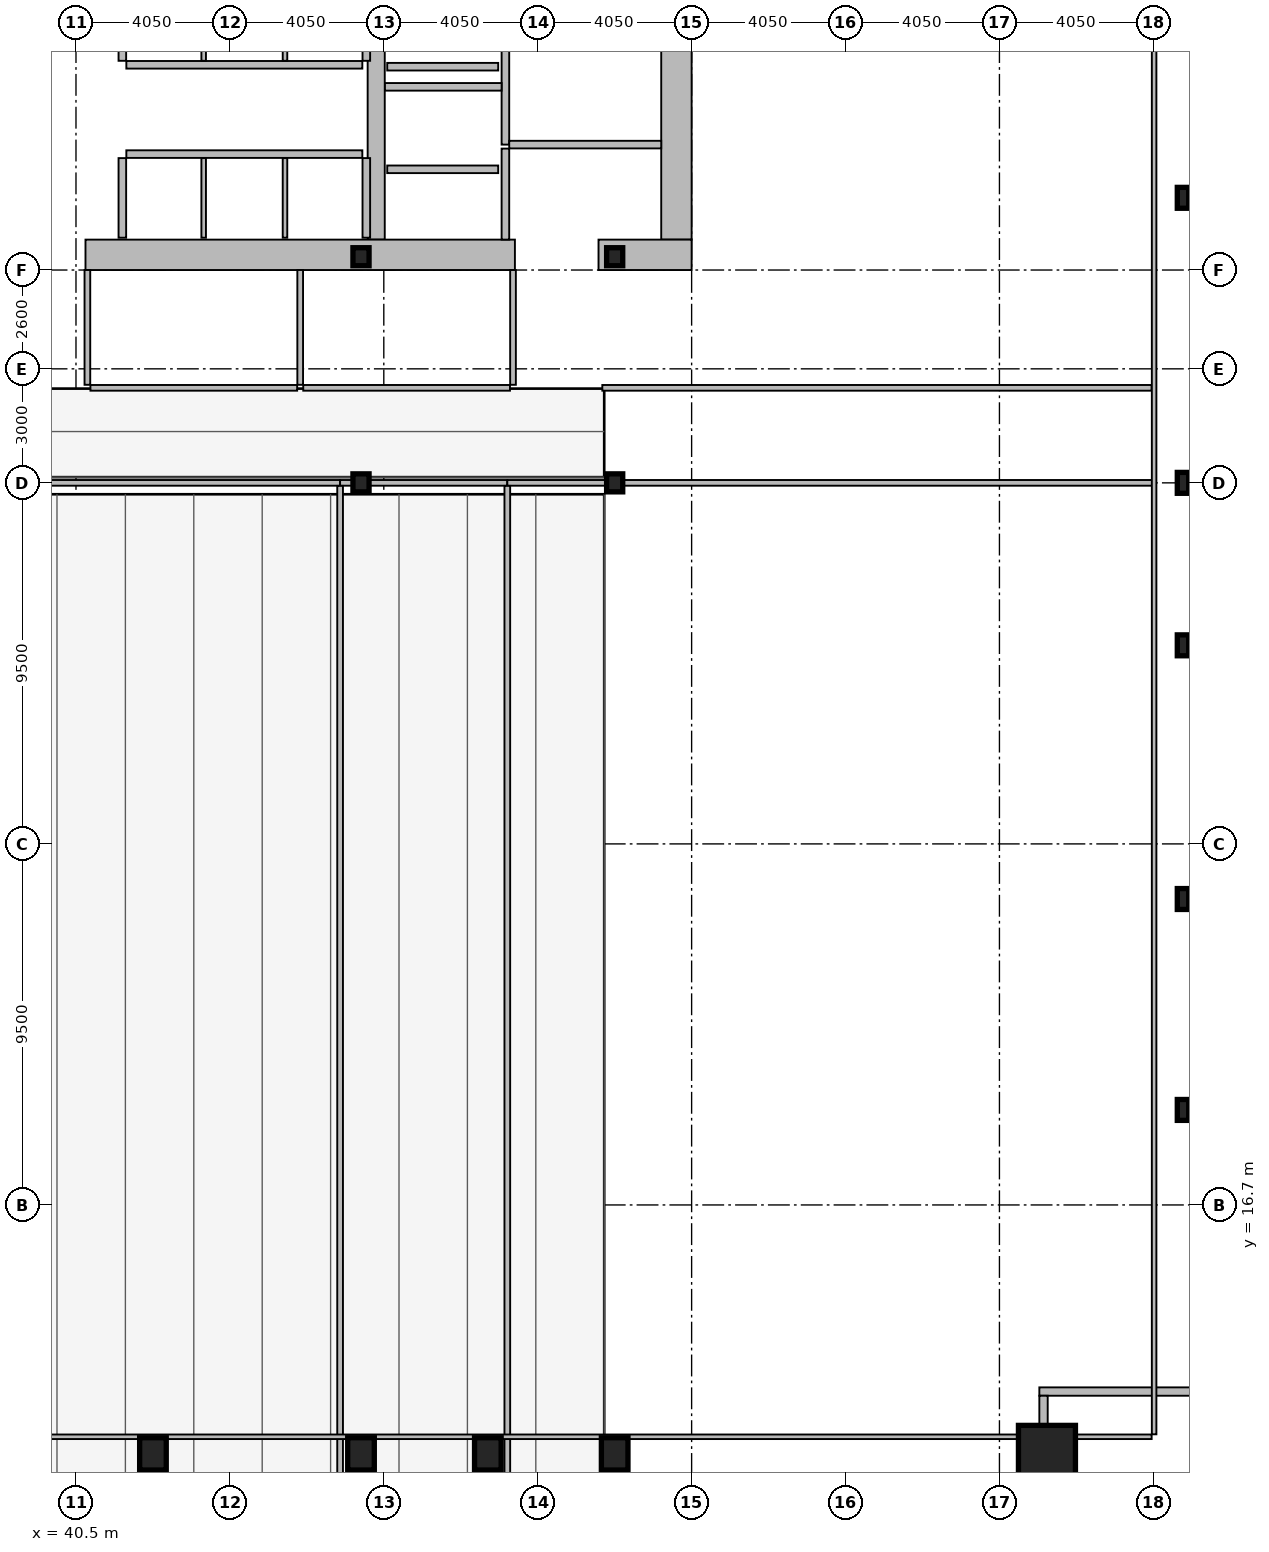
"""IFC4 building model, lengths in metres.
Left out: names, types, materials, properties, quantities, classifications, styles, units other than length and angle.
Written with IfcOpenShell. Run it as: python <this file> out.ifc"""

import sys

from ifc_helpers import new_model, si_unit, direction, frame, frame_2d, origin, origin_2d, place, context, subcontext, project, spatial, rectangle, hollow_rectangle, i_section, extrude, element, fill, save


model = new_model("IFC4")
c1 = context("Model", 3, precision=1e-05, world=origin(), true_north=direction((0.0, 1.0)))
c2 = subcontext(c1, "Body", "Model", "MODEL_VIEW")
j1 = project(units=[si_unit("LENGTHUNIT", "METRE"), si_unit("PLANEANGLEUNIT", "RADIAN")], contexts=[c1])
p1 = place(None, origin())
s1 = spatial("IfcSite", under=j1, at=p1, CompositionType="ELEMENT")
p2 = place(p1, origin())
s2 = spatial("IfcBuilding", under=s1, at=p2, CompositionType="ELEMENT")
p3 = place(p2, frame((0.0, 0.0, 85.8)))
s3 = spatial("IfcBuildingStorey", under=s2, at=p3, CompositionType="ELEMENT", Elevation=85.8)
p4 = place(p3, frame((56.3, 52.9, 0.0), z_axis=(0.0, 0.0, 1.0), x_axis=(0.0, -1.0, 0.0)))
e1 = element("IfcWall", 1, at=p4, inside=s3, PredefinedType="SHEAR", context=c2, shape_type="SweptSolid", body=[
    extrude(rectangle(XDim=10.8, YDim=0.8, at=frame_2d((5.4, 0.0))), origin(), (0.0, 0.0, 1.0), 4.62),
])
p5 = place(p3, frame((48.4, 42.1, 0.0), z_axis=(0.0, 0.0, 1.0), x_axis=(0.0, 1.0, 0.0)))
e2 = element("IfcWall", 2, at=p5, inside=s3, PredefinedType="SHEAR", context=c2, shape_type="SweptSolid", body=[
    extrude(rectangle(XDim=10.8, YDim=0.45, at=frame_2d((5.4, 0.0))), origin(), (0.0, 0.0, 1.0), 4.62),
])
p6 = place(p3, frame((52.05, 41.7, 0.0), z_axis=(0.0, 0.0, 1.0), x_axis=(-1.0, 0.0, 0.0)))
e3 = element("IfcWall", 3, at=p6, inside=s3, PredefinedType="SHEAR", context=c2, shape_type="SweptSolid", body=[
    extrude(rectangle(XDim=11.3, YDim=0.8, at=frame_2d((5.65, 0.0))), origin(), (0.0, 0.0, 1.0), 4.62),
])
p7 = place(p3, frame((56.7, 41.7, 0.0), z_axis=(0.0, 0.0, 1.0), x_axis=(-1.0, 0.0, 0.0)))
e4 = element("IfcWall", 4, at=p7, inside=s3, PredefinedType="SHEAR", context=c2, shape_type="SweptSolid", body=[
    extrude(rectangle(XDim=2.45, YDim=0.8, at=frame_2d((1.225, 0.0))), origin(), (0.0, 0.0, 1.0), 4.62),
])
p8 = place(p3, frame((66.05, 10.15, 0.0), z_axis=(0.0, 0.0, 1.0), x_axis=(1.0, 0.0, 0.0)))
e5 = element("IfcColumn", 5, at=p8, inside=s3, PredefinedType="COLUMN", context=c2, shape_type="SweptSolid", body=[
    extrude(hollow_rectangle(XDim=1.5, YDim=1.5, WallThickness=0.07, at=origin_2d()), origin(), (0.0, 0.0, 1.0), 4.8),
])
for number, where, z_axis, x_axis in (
    (6, (42.525, 10.15, 0.0), (0.0, 0.0, 1.0), (1.0, 0.0, 0.0)),
    (7, (48.0, 10.15, 0.0), (0.0, 0.0, 1.0), (1.0, 0.0, 0.0)),
    (8, (51.337, 10.15, 0.0), (0.0, 0.0, 1.0), (1.0, 0.0, 0.0)),
    (9, (54.675, 10.15, 0.0), (0.0, 0.0, 1.0), (1.0, 0.0, 0.0)),
):
    element("IfcColumn", number, at=place(p3, frame(where, z_axis=z_axis, x_axis=x_axis)), inside=s3, PredefinedType="COLUMN", context=c2, shape_type="SweptSolid", body=[
        extrude(hollow_rectangle(XDim=0.7, YDim=0.85, WallThickness=0.05, at=origin_2d()), origin(), (0.0, 0.0, 1.0), 4.8),
    ])
for number, where, z_axis, x_axis in (
    (10, (69.63, 19.2, 0.0), (0.0, 0.0, 1.0), (1.0, 0.0, 0.0)),
    (11, (69.63, 24.75, 0.0), (0.0, 0.0, 1.0), (1.0, 0.0, 0.0)),
    (12, (69.63, 31.425, 0.0), (0.0, 0.0, 1.0), (1.0, 0.0, 0.0)),
    (13, (69.63, 35.7, 0.0), (0.0, 0.0, 1.0), (1.0, 0.0, 0.0)),
    (14, (69.63, 43.2, 0.0), (0.0, 0.0, 1.0), (1.0, 0.0, 0.0)),
):
    element("IfcColumn", number, at=place(p3, frame(where, z_axis=z_axis, x_axis=x_axis)), inside=s3, PredefinedType="COLUMN", context=c2, shape_type="SweptSolid", body=[
        extrude(i_section(OverallWidth=0.3, OverallDepth=0.55, WebThickness=0.015, FlangeThickness=0.029, at=origin_2d()), origin(), (0.0, 0.0, 1.0), 4.8),
    ])
for number, where, z_axis, x_axis in (
    (15, (48.0, 35.7, 0.0), (0.0, 0.0, 1.0), (1.0, 0.0, 0.0)),
    (16, (48.0, 41.65, 0.0), (0.0, 0.0, 1.0), (1.0, 0.0, 0.0)),
    (17, (54.675, 35.7, 0.0), (0.0, 0.0, 1.0), (1.0, 0.0, 0.0)),
    (18, (54.675, 41.65, 0.0), (0.0, 0.0, 1.0), (1.0, 0.0, 0.0)),
):
    element("IfcColumn", number, at=place(p3, frame(where, z_axis=z_axis, x_axis=x_axis)), inside=s3, PredefinedType="COLUMN", context=c2, shape_type="SweptSolid", body=[
        extrude(i_section(OverallWidth=0.424, OverallDepth=0.474, WebThickness=0.048, FlangeThickness=0.077, at=origin_2d()), origin(), (0.0, 0.0, 1.0), 4.8),
    ])
p9 = place(p3, frame((70.07, 11.79, 0.0), z_axis=(0.0, 0.0, 1.0), x_axis=(-1.0, 0.0, 0.0)))
e19 = element("IfcWall", 19, at=p9, inside=s3, PredefinedType="SOLIDWALL", context=c2, shape_type="SweptSolid", body=[
    extrude(rectangle(XDim=4.22, YDim=0.22, at=frame_2d((2.11, 0.0))), origin(), (0.0, 0.0, 1.0), 3.96),
])
p10 = place(p3, frame((65.96, 11.68, 0.0), z_axis=(0.0, 0.0, 1.0), x_axis=(0.0, -1.0, 0.0)))
e20 = element("IfcWall", 20, at=p10, inside=s3, PredefinedType="SOLIDWALL", context=c2, shape_type="SweptSolid", body=[
    extrude(rectangle(XDim=3.91, YDim=0.22, at=frame_2d((1.955, 0.0))), origin(), (0.0, 0.0, 1.0), 3.96),
])
p11 = place(p3, frame((51.61, 43.95, 0.0), z_axis=(0.0, 0.0, 1.0), x_axis=(-1.0, 0.0, 0.0)))
e21 = element("IfcWall", 21, at=p11, inside=s3, PredefinedType="PARTITIONING", context=c2, shape_type="SweptSolid", body=[
    extrude(rectangle(XDim=2.92, YDim=0.2, at=frame_2d((1.46, 0.0))), origin(), (0.0, 0.0, 1.0), 4.62),
])
p12 = place(p11, frame((0.81, 0.0, 0.0)))
e22 = element("IfcOpeningElement", 22, at=p12, cuts=e21, PredefinedType="OPENING", context=c2, shape_type="SweptSolid", body=[
    extrude(rectangle(XDim=1.3, YDim=2.18, at=frame_2d((0.65, 1.09))), frame((0.0, 0.11, 0.0), z_axis=(0.0, -1.0, 0.0), x_axis=(1.0, 0.0, 0.0)), (0.0, 0.0, 1.0), 0.22),
])
p13 = place(p3, frame((51.61, 46.65, 0.0), z_axis=(0.0, 0.0, 1.0), x_axis=(-1.0, 0.0, 0.0)))
e23 = element("IfcWall", 23, at=p13, inside=s3, PredefinedType="PARTITIONING", context=c2, shape_type="SweptSolid", body=[
    extrude(rectangle(XDim=2.92, YDim=0.2, at=frame_2d((1.46, 0.0))), origin(), (0.0, 0.0, 1.0), 4.62),
])
p14 = place(p13, frame((0.86, 0.0, 0.0)))
e24 = element("IfcOpeningElement", 24, at=p14, cuts=e23, PredefinedType="OPENING", context=c2, shape_type="SweptSolid", body=[
    extrude(rectangle(XDim=1.2, YDim=2.18, at=frame_2d((0.6, 1.09))), frame((0.0, 0.11, 0.0), z_axis=(0.0, -1.0, 0.0), x_axis=(1.0, 0.0, 0.0)), (0.0, 0.0, 1.0), 0.22),
])
p15 = place(p3, frame((51.8, 44.6, 0.0), z_axis=(0.0, 0.0, 1.0), x_axis=(0.0, 1.0, 0.0)))
e25 = element("IfcWall", 25, at=p15, inside=s3, PredefinedType="PARTITIONING", context=c2, shape_type="SweptSolid", body=[
    extrude(rectangle(XDim=4.3, YDim=0.2, at=frame_2d((2.15, 0.0))), origin(), (0.0, 0.0, 1.0), 4.62),
])
p16 = place(p3, frame((51.9, 44.6, 0.0), z_axis=(0.0, 0.0, 1.0), x_axis=(1.0, 0.0, 0.0)))
e26 = element("IfcWall", 26, at=p16, inside=s3, PredefinedType="PARTITIONING", context=c2, shape_type="SweptSolid", body=[
    extrude(rectangle(XDim=4.0, YDim=0.2, at=frame_2d((2.0, 0.0))), origin(), (0.0, 0.0, 1.0), 4.62),
])
p17 = place(p16, frame((1.15, 0.0, 0.0)))
e27 = element("IfcOpeningElement", 27, at=p17, cuts=e26, PredefinedType="OPENING", context=c2, shape_type="SweptSolid", body=[
    extrude(rectangle(XDim=1.05, YDim=2.15, at=frame_2d((0.525, 1.075))), frame((0.0, 0.11, 0.0), z_axis=(0.0, -1.0, 0.0), x_axis=(1.0, 0.0, 0.0)), (0.0, 0.0, 1.0), 0.22),
])
p18 = place(p3, frame((48.63, 46.12, 0.0), z_axis=(0.0, 0.0, 1.0), x_axis=(1.0, 0.0, 0.0)))
e28 = element("IfcWall", 28, at=p18, inside=s3, PredefinedType="PARTITIONING", context=c2, shape_type="SweptSolid", body=[
    extrude(rectangle(XDim=3.07, YDim=0.2, at=frame_2d((1.535, 0.0))), origin(), (0.0, 0.0, 1.0), 4.62),
])
p19 = place(p3, frame((51.8, 42.1, 0.0), z_axis=(0.0, 0.0, 1.0), x_axis=(0.0, 1.0, 0.0)))
e29 = element("IfcWall", 29, at=p19, inside=s3, PredefinedType="PARTITIONING", context=c2, shape_type="SweptSolid", body=[
    extrude(rectangle(XDim=2.395, YDim=0.2, at=frame_2d((1.198, 0.0))), origin(), (0.0, 0.0, 1.0), 4.62),
])
p20 = place(p19, frame((0.38, 0.0, 0.0)))
e30 = element("IfcOpeningElement", 30, at=p20, cuts=e29, PredefinedType="OPENING", context=c2, shape_type="SweptSolid", body=[
    extrude(rectangle(XDim=1.05, YDim=2.15, at=frame_2d((0.525, 1.075))), frame((0.0, 0.11, 0.0), z_axis=(0.0, -1.0, 0.0), x_axis=(1.0, 0.0, 0.0)), (0.0, 0.0, 1.0), 0.22),
])
p21 = place(p3, frame((41.825, 46.7, 0.0), z_axis=(0.0, 0.0, 1.0), x_axis=(1.0, 0.0, 0.0)))
e31 = element("IfcWall", 31, at=p21, inside=s3, PredefinedType="PARTITIONING", context=c2, shape_type="SweptSolid", body=[
    extrude(rectangle(XDim=6.21, YDim=0.2, at=frame_2d((3.105, 0.0))), origin(), (0.0, 0.0, 1.0), 4.62),
])
for number, where, z_axis, x_axis in (
    (32, (41.72, 46.805, 0.0), (0.0, 0.0, 1.0), (0.0, 1.0, 0.0)),
    (33, (48.14, 46.805, 0.0), (0.0, 0.0, 1.0), (0.0, 1.0, 0.0)),
):
    element("IfcWall", number, at=place(p3, frame(where, z_axis=z_axis, x_axis=x_axis)), inside=s3, PredefinedType="PARTITIONING", context=c2, shape_type="SweptSolid", body=[
        extrude(rectangle(XDim=2.09, YDim=0.2, at=frame_2d((1.045, 0.0))), origin(), (0.0, 0.0, 1.0), 4.62),
    ])
for number, where, z_axis, x_axis in (
    (34, (43.86, 46.805, 0.0), (0.0, 0.0, 1.0), (0.0, 1.0, 0.0)),
    (35, (46.0, 46.805, 0.0), (0.0, 0.0, 1.0), (0.0, 1.0, 0.0)),
):
    element("IfcWall", number, at=place(p3, frame(where, z_axis=z_axis, x_axis=x_axis)), inside=s3, PredefinedType="PARTITIONING", context=c2, shape_type="SweptSolid", body=[
        extrude(rectangle(XDim=2.09, YDim=0.12, at=frame_2d((1.045, 0.0))), origin(), (0.0, 0.0, 1.0), 4.62),
    ])
p22 = place(p3, frame((41.825, 44.35, 0.0), z_axis=(0.0, 0.0, 1.0), x_axis=(1.0, 0.0, 0.0)))
e36 = element("IfcWall", 36, at=p22, inside=s3, PredefinedType="PARTITIONING", context=c2, shape_type="SweptSolid", body=[
    extrude(rectangle(XDim=6.21, YDim=0.2, at=frame_2d((3.105, 0.0))), origin(), (0.0, 0.0, 1.0), 4.62),
])
for number, where, z_axis, x_axis in (
    (37, (41.72, 42.15, 0.0), (0.0, 0.0, 1.0), (0.0, 1.0, 0.0)),
    (38, (48.14, 42.15, 0.0), (0.0, 0.0, 1.0), (0.0, 1.0, 0.0)),
):
    element("IfcWall", number, at=place(p3, frame(where, z_axis=z_axis, x_axis=x_axis)), inside=s3, PredefinedType="PARTITIONING", context=c2, shape_type="SweptSolid", body=[
        extrude(rectangle(XDim=2.095, YDim=0.2, at=frame_2d((1.048, 0.0))), origin(), (0.0, 0.0, 1.0), 4.62),
    ])
for number, where, z_axis, x_axis in (
    (39, (43.86, 42.15, 0.0), (0.0, 0.0, 1.0), (0.0, 1.0, 0.0)),
    (40, (46.0, 42.15, 0.0), (0.0, 0.0, 1.0), (0.0, 1.0, 0.0)),
):
    element("IfcWall", number, at=place(p3, frame(where, z_axis=z_axis, x_axis=x_axis)), inside=s3, PredefinedType="PARTITIONING", context=c2, shape_type="SweptSolid", body=[
        extrude(rectangle(XDim=2.095, YDim=0.12, at=frame_2d((1.048, 0.0))), origin(), (0.0, 0.0, 1.0), 4.62),
    ])
p23 = place(p3, frame((36.42, 35.7, 0.0), z_axis=(0.0, 0.0, 1.0), x_axis=(1.0, 0.0, 0.0)))
e41 = element("IfcWall", 41, at=p23, inside=s3, PredefinedType="PARTITIONING", context=c2, shape_type="SweptSolid", body=[
    extrude(rectangle(XDim=11.03, YDim=0.15, at=frame_2d((5.515, 0.0))), origin(), (0.0, 0.0, 1.0), 3.81),
])
p24 = place(p23, frame((4.2, 0.0, 0.0)))
e42 = element("IfcOpeningElement", 42, at=p24, cuts=e41, PredefinedType="OPENING", context=c2, shape_type="SweptSolid", body=[
    extrude(rectangle(XDim=1.4, YDim=2.15, at=frame_2d((0.7, 1.075))), frame((0.0, 0.085, 0.0), z_axis=(0.0, -1.0, 0.0), x_axis=(1.0, 0.0, 0.0)), (0.0, 0.0, 1.0), 0.17),
])
p25 = place(p3, frame((47.45, 35.7, 0.0), z_axis=(0.0, 0.0, 1.0), x_axis=(1.0, 0.0, 0.0)))
e43 = element("IfcWall", 43, at=p25, inside=s3, PredefinedType="PARTITIONING", context=c2, shape_type="SweptSolid", body=[
    extrude(rectangle(XDim=4.4, YDim=0.15, at=frame_2d((2.2, 0.0))), origin(), (0.0, 0.0, 1.0), 3.81),
])
p26 = place(p3, frame((51.85, 35.7, 0.0), z_axis=(0.0, 0.0, 1.0), x_axis=(1.0, 0.0, 0.0)))
e44 = element("IfcWall", 44, at=p26, inside=s3, PredefinedType="PARTITIONING", context=c2, shape_type="SweptSolid", body=[
    extrude(rectangle(XDim=17.02, YDim=0.15, at=frame_2d((8.51, 0.0))), origin(), (0.0, 0.0, 1.0), 3.81),
])
p27 = place(p26, frame((3.55, 0.0, 0.0)))
e45 = element("IfcOpeningElement", 45, at=p27, cuts=e44, PredefinedType="OPENING", context=c2, shape_type="SweptSolid", body=[
    extrude(rectangle(XDim=1.5, YDim=2.15, at=frame_2d((0.75, 1.075))), frame((0.0, 0.085, 0.0), z_axis=(0.0, -1.0, 0.0), x_axis=(1.0, 0.0, 0.0)), (0.0, 0.0, 1.0), 0.17),
])
for number, where, z_axis, x_axis in (
    (46, (47.45, 7.82, 0.0), (0.0, 0.0, 1.0), (0.0, 1.0, 0.0)),
    (47, (51.85, 7.82, 0.0), (0.0, 0.0, 1.0), (0.0, 1.0, 0.0)),
):
    element("IfcWall", number, at=place(p3, frame(where, z_axis=z_axis, x_axis=x_axis)), inside=s3, PredefinedType="PARTITIONING", context=c2, shape_type="SweptSolid", body=[
        extrude(rectangle(XDim=27.8, YDim=0.15, at=frame_2d((13.9, 0.0))), origin(), (0.0, 0.0, 1.0), 3.81),
    ])
p28 = place(p3, frame((40.88, 38.2, 0.0), z_axis=(0.0, 0.0, 1.0), x_axis=(1.0, 0.0, 0.0)))
e48 = element("IfcWall", 48, at=p28, inside=s3, PredefinedType="PARTITIONING", context=c2, shape_type="SweptSolid", body=[
    extrude(rectangle(XDim=5.44, YDim=0.15, at=frame_2d((2.72, 0.0))), origin(), (0.0, 0.0, 1.0), 3.81),
])
p29 = place(p28, frame((3.2, 0.0, 0.0)))
e49 = element("IfcOpeningElement", 49, at=p29, cuts=e48, PredefinedType="OPENING", context=c2, shape_type="SweptSolid", body=[
    extrude(rectangle(XDim=0.95, YDim=2.1, at=frame_2d((0.475, 1.05))), frame((0.0, 0.085, 0.0), z_axis=(0.0, -1.0, 0.0), x_axis=(1.0, 0.0, 0.0)), (0.0, 0.0, 1.0), 0.17),
])
p30 = place(p3, frame((46.48, 38.2, 0.0), z_axis=(0.0, 0.0, 1.0), x_axis=(1.0, 0.0, 0.0)))
e50 = element("IfcWall", 50, at=p30, inside=s3, PredefinedType="PARTITIONING", context=c2, shape_type="SweptSolid", body=[
    extrude(rectangle(XDim=5.44, YDim=0.15, at=frame_2d((2.72, 0.0))), origin(), (0.0, 0.0, 1.0), 3.81),
])
p31 = place(p30, frame((2.85, 0.0, 0.0)))
e51 = element("IfcOpeningElement", 51, at=p31, cuts=e50, PredefinedType="OPENING", context=c2, shape_type="SweptSolid", body=[
    extrude(rectangle(XDim=0.95, YDim=2.1, at=frame_2d((0.475, 1.05))), frame((0.0, 0.085, 0.0), z_axis=(0.0, -1.0, 0.0), x_axis=(1.0, 0.0, 0.0)), (0.0, 0.0, 1.0), 0.17),
])
for number, where, z_axis, x_axis in (
    (52, (40.8, 38.28, 0.0), (0.0, 0.0, 1.0), (0.0, 1.0, 0.0)),
    (53, (46.4, 38.28, 0.0), (0.0, 0.0, 1.0), (0.0, 1.0, 0.0)),
    (54, (52.0, 38.28, 0.0), (0.0, 0.0, 1.0), (0.0, 1.0, 0.0)),
):
    element("IfcWall", number, at=place(p3, frame(where, z_axis=z_axis, x_axis=x_axis)), inside=s3, PredefinedType="PARTITIONING", context=c2, shape_type="SweptSolid", body=[
        extrude(rectangle(XDim=3.02, YDim=0.15, at=frame_2d((1.51, 0.0))), origin(), (0.0, 0.0, 1.0), 4.62),
    ])
p32 = place(p3, frame((54.35, 38.2, 0.0), z_axis=(0.0, 0.0, 1.0), x_axis=(1.0, 0.0, 0.0)))
e55 = element("IfcWall", 55, at=p32, inside=s3, PredefinedType="PARTITIONING", context=c2, shape_type="SweptSolid", body=[
    extrude(rectangle(XDim=14.455, YDim=0.15, at=frame_2d((7.228, 0.0))), origin(), (0.0, 0.0, 1.0), 3.81),
])
p33 = place(p32, frame((1.8, 0.0, 0.0)))
e56 = element("IfcOpeningElement", 56, at=p33, cuts=e55, PredefinedType="OPENING", context=c2, shape_type="SweptSolid", body=[
    extrude(rectangle(XDim=0.95, YDim=2.1, at=frame_2d((0.475, 1.05))), frame((0.0, 0.085, 0.0), z_axis=(0.0, -1.0, 0.0), x_axis=(1.0, 0.0, 0.0)), (0.0, 0.0, 1.0), 0.17),
])
p34 = place(p3, frame((68.87, 10.665, 0.0), z_axis=(0.0, 0.0, 1.0), x_axis=(0.0, 1.0, 0.0)))
e57 = element("IfcWall", 57, at=p34, inside=s3, PredefinedType="PARTITIONING", context=c2, shape_type="SweptSolid", body=[
    extrude(rectangle(XDim=42.11, YDim=0.12, at=frame_2d((21.055, 0.0))), origin(), (0.0, 0.0, 1.0), 3.81),
])
p35 = place(p3, frame((4.095, 10.6, 0.0), z_axis=(0.0, 0.0, 1.0), x_axis=(1.0, 0.0, 0.0)))
e58 = element("IfcWall", 58, at=p35, inside=s3, PredefinedType="PARTITIONING", context=c2, shape_type="SweptSolid", body=[
    extrude(rectangle(XDim=64.71, YDim=0.12, at=frame_2d((32.355, 0.0))), origin(), (0.0, 0.0, 1.0), 3.81),
])
p36 = place(p12, origin())
e59 = element("IfcDoor", 59, at=p36, inside=s3, OperationType="SLIDING_TO_LEFT", PredefinedType="DOOR", context=c2, shape_type="SweptSolid", body=[
    extrude(rectangle(XDim=1.3, YDim=2.18, at=frame_2d((0.65, 1.09))), frame((0.0, 0.025, 0.0), z_axis=(0.0, -1.0, 0.0), x_axis=(1.0, 0.0, 0.0)), (0.0, 0.0, 1.0), 0.05),
])
fill(e22, e59)
p37 = place(p14, origin())
e60 = element("IfcDoor", 60, at=p37, inside=s3, OperationType="SLIDING_TO_LEFT", PredefinedType="DOOR", context=c2, shape_type="SweptSolid", body=[
    extrude(rectangle(XDim=1.2, YDim=2.18, at=frame_2d((0.6, 1.09))), frame((0.0, 0.025, 0.0), z_axis=(0.0, -1.0, 0.0), x_axis=(1.0, 0.0, 0.0)), (0.0, 0.0, 1.0), 0.05),
])
fill(e24, e60)
p38 = place(p17, origin())
e61 = element("IfcDoor", 61, at=p38, inside=s3, OperationType="SINGLE_SWING_RIGHT", PredefinedType="DOOR", context=c2, shape_type="SweptSolid", body=[
    extrude(rectangle(XDim=1.05, YDim=2.15, at=frame_2d((0.525, 1.075))), frame((0.0, 0.025, 0.0), z_axis=(0.0, -1.0, 0.0), x_axis=(1.0, 0.0, 0.0)), (0.0, 0.0, 1.0), 0.05),
])
fill(e27, e61)
p39 = place(p20, origin())
e62 = element("IfcDoor", 62, at=p39, inside=s3, OperationType="SINGLE_SWING_LEFT", PredefinedType="DOOR", context=c2, shape_type="SweptSolid", body=[
    extrude(rectangle(XDim=1.05, YDim=2.15, at=frame_2d((0.525, 1.075))), frame((0.0, 0.025, 0.0), z_axis=(0.0, -1.0, 0.0), x_axis=(1.0, 0.0, 0.0)), (0.0, 0.0, 1.0), 0.05),
])
fill(e30, e62)
p40 = place(p24, origin())
e63 = element("IfcDoor", 63, at=p40, inside=s3, OperationType="DOUBLE_DOOR_SINGLE_SWING", PredefinedType="DOOR", context=c2, shape_type="SweptSolid", body=[
    extrude(rectangle(XDim=1.4, YDim=2.15, at=frame_2d((0.7, 1.075))), frame((0.0, 0.025, 0.0), z_axis=(0.0, -1.0, 0.0), x_axis=(1.0, 0.0, 0.0)), (0.0, 0.0, 1.0), 0.05),
])
fill(e42, e63)
p41 = place(p27, origin())
e64 = element("IfcDoor", 64, at=p41, inside=s3, OperationType="DOUBLE_DOOR_SINGLE_SWING", PredefinedType="DOOR", context=c2, shape_type="SweptSolid", body=[
    extrude(rectangle(XDim=1.5, YDim=2.15, at=frame_2d((0.75, 1.075))), frame((0.0, 0.025, 0.0), z_axis=(0.0, -1.0, 0.0), x_axis=(1.0, 0.0, 0.0)), (0.0, 0.0, 1.0), 0.05),
])
fill(e45, e64)
p42 = place(p29, origin())
e65 = element("IfcDoor", 65, at=p42, inside=s3, OperationType="SINGLE_SWING_RIGHT", PredefinedType="DOOR", context=c2, shape_type="SweptSolid", body=[
    extrude(rectangle(XDim=0.95, YDim=2.1, at=frame_2d((0.475, 1.05))), frame((0.0, 0.025, 0.0), z_axis=(0.0, -1.0, 0.0), x_axis=(1.0, 0.0, 0.0)), (0.0, 0.0, 1.0), 0.05),
])
fill(e49, e65)
p43 = place(p31, origin())
e66 = element("IfcDoor", 66, at=p43, inside=s3, OperationType="SINGLE_SWING_LEFT", PredefinedType="DOOR", context=c2, shape_type="SweptSolid", body=[
    extrude(rectangle(XDim=0.95, YDim=2.1, at=frame_2d((0.475, 1.05))), frame((0.0, 0.025, 0.0), z_axis=(0.0, -1.0, 0.0), x_axis=(1.0, 0.0, 0.0)), (0.0, 0.0, 1.0), 0.05),
])
fill(e51, e66)
p44 = place(p33, origin())
e67 = element("IfcDoor", 67, at=p44, inside=s3, OperationType="SINGLE_SWING_LEFT", PredefinedType="DOOR", context=c2, shape_type="SweptSolid", body=[
    extrude(rectangle(XDim=0.95, YDim=2.1, at=frame_2d((0.475, 1.05))), frame((0.0, 0.025, 0.0), z_axis=(0.0, -1.0, 0.0), x_axis=(1.0, 0.0, 0.0)), (0.0, 0.0, 1.0), 0.05),
])
fill(e56, e67)
save(model, sys.argv[1])
